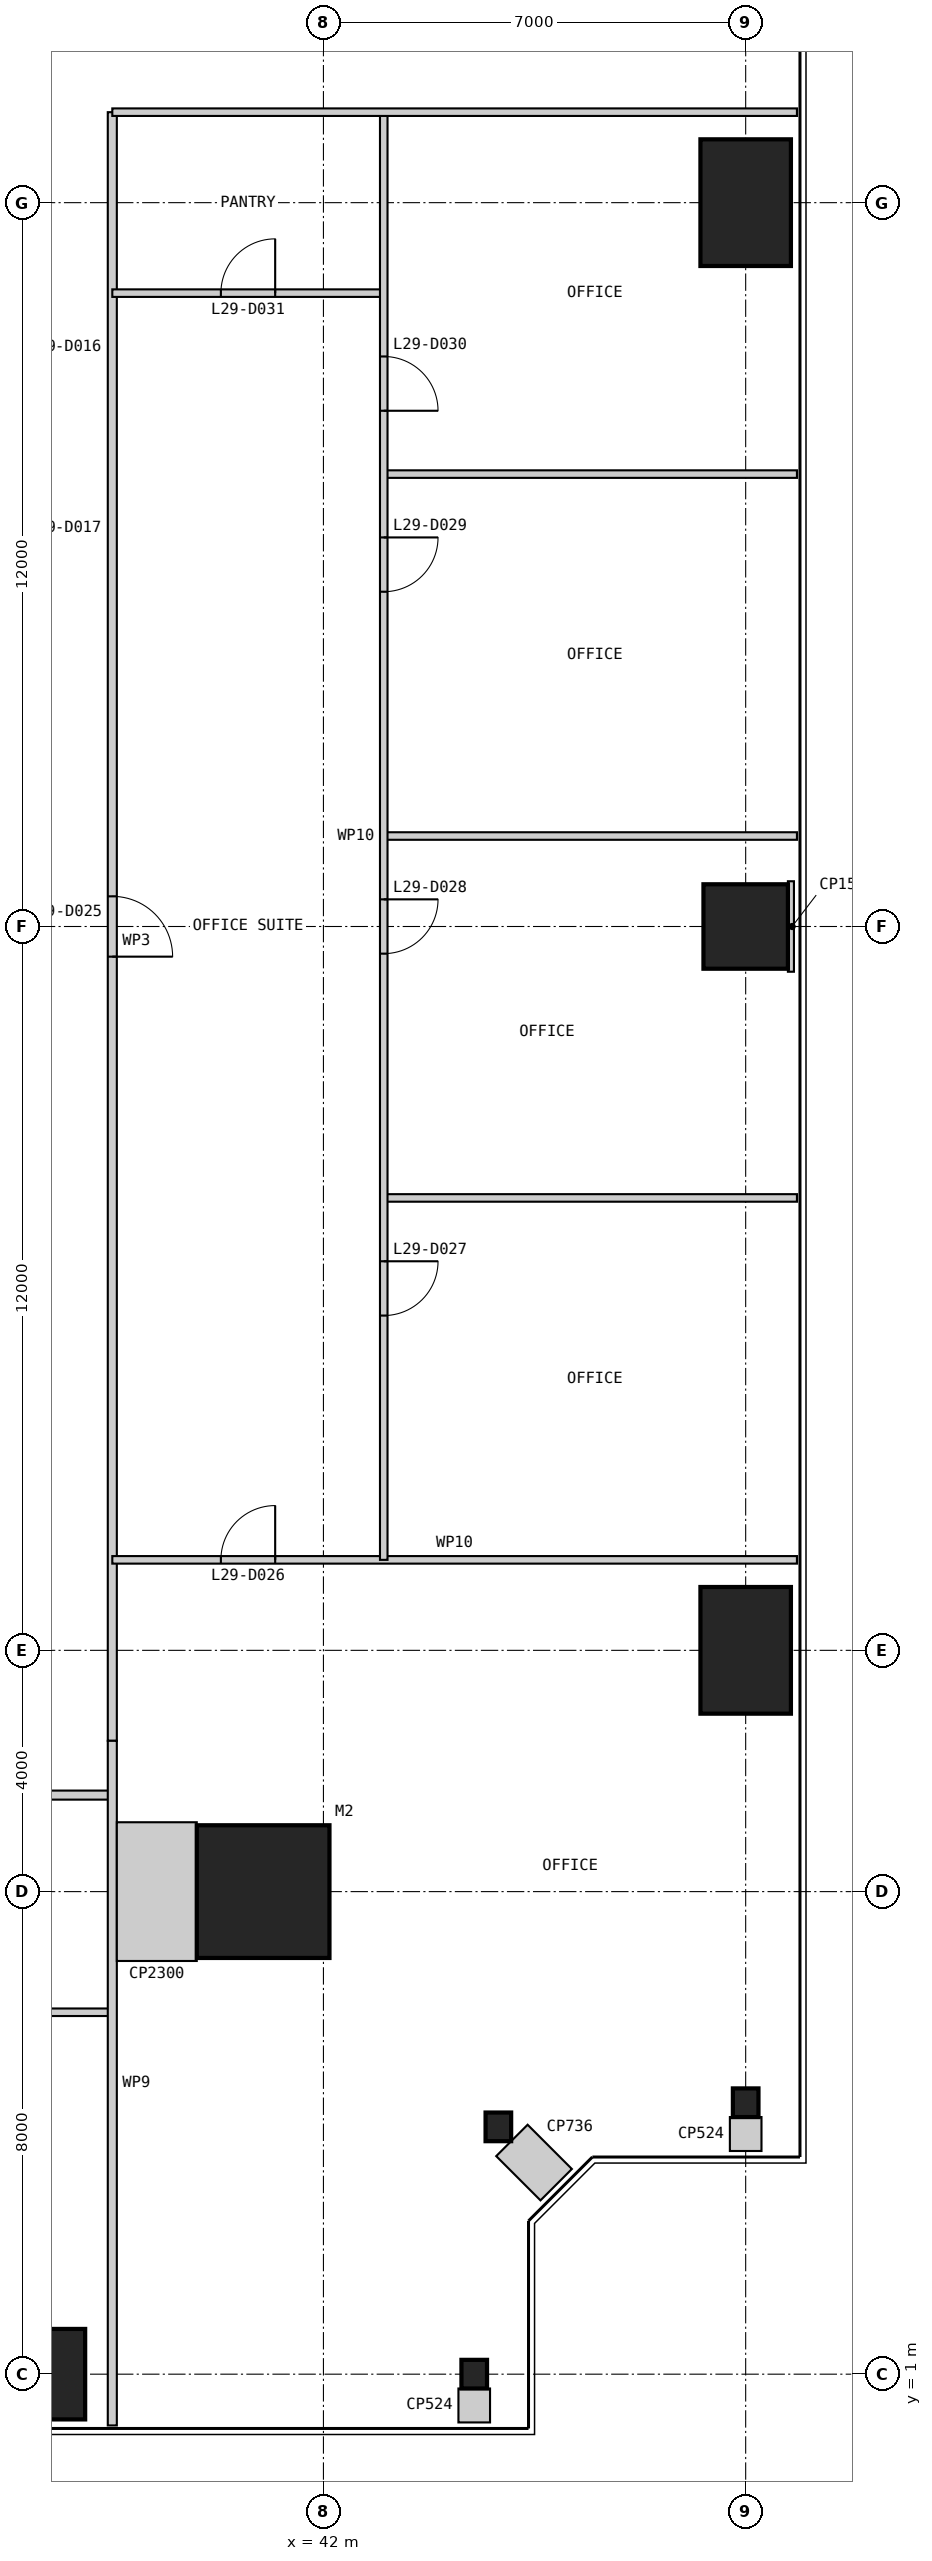
"""IFC4 building model, lengths in metres.
Left out: names, types, materials, properties, quantities, classifications, styles, units other than length and angle.
Written with IfcOpenShell. Run it as: python <this file> out.ifc"""

import sys

from ifc_helpers import new_model, si_unit, direction, frame, frame_2d, origin, origin_2d, place, context, subcontext, project, spatial, rectangle, i_section, extrude, element, fill, save


model = new_model("IFC4")
c1 = context("Model", 3, precision=1e-05, world=origin(), true_north=direction((0.0, 1.0)))
c2 = subcontext(c1, "Body", "Model", "MODEL_VIEW")
j1 = project(units=[si_unit("LENGTHUNIT", "METRE"), si_unit("PLANEANGLEUNIT", "RADIAN")], contexts=[c1])
p1 = place(None, origin())
s1 = spatial("IfcSite", under=j1, at=p1, CompositionType="ELEMENT")
p2 = place(p1, origin())
s2 = spatial("IfcBuilding", under=s1, at=p2, CompositionType="ELEMENT")
p3 = place(p2, frame((0.0, 0.0, 126.4)))
s3 = spatial("IfcBuildingStorey", under=s2, at=p3, CompositionType="ELEMENT", Elevation=126.4)
p4 = place(p3, frame((41.0, 9.0, 0.0), z_axis=(0.0, 0.0, 1.0), x_axis=(1.0, 0.0, 0.0)))
e1 = element("IfcColumn", 1, at=p4, inside=s3, PredefinedType="COLUMN", context=c2, shape_type="SweptSolid", body=[
    extrude(rectangle(XDim=2.2, YDim=2.2, at=origin_2d()), origin(), (0.0, 0.0, 1.0), 4.0),
])
p5 = place(p3, frame((37.0, 1.0, 0.0), z_axis=(0.0, 0.0, 1.0), x_axis=(1.0, 0.0, 0.0)))
e2 = element("IfcColumn", 2, at=p5, inside=s3, PredefinedType="COLUMN", context=c2, shape_type="SweptSolid", body=[
    extrude(rectangle(XDim=2.1, YDim=1.5, at=origin_2d()), origin(), (0.0, 0.0, 1.0), 4.0),
])
for number, where, z_axis, x_axis in (
    (3, (44.5, 1.0, 0.0), (0.0, 0.0, 1.0), (1.0, 0.0, 0.0)),
    (4, (44.9, 5.1, 0.0), (0.0, 0.0, 1.0), (1.0, 0.0, 0.0)),
    (5, (49.0, 5.5, 0.0), (0.0, 0.0, 1.0), (1.0, 0.0, 0.0)),
):
    element("IfcColumn", number, at=place(p3, frame(where, z_axis=z_axis, x_axis=x_axis)), inside=s3, PredefinedType="COLUMN", context=c2, shape_type="SweptSolid", body=[
        extrude(i_section(OverallWidth=0.424, OverallDepth=0.475, WebThickness=0.048, FlangeThickness=0.077, at=origin_2d()), origin(), (0.0, 0.0, 1.0), 4.0),
    ])
p6 = place(p3, frame((49.0, 13.0, 0.0), z_axis=(0.0, 0.0, 1.0), x_axis=(1.0, 0.0, 0.0)))
e6 = element("IfcColumn", 6, at=p6, inside=s3, PredefinedType="COLUMN", context=c2, shape_type="SweptSolid", body=[
    extrude(rectangle(XDim=1.5, YDim=2.1, at=origin_2d()), origin(), (0.0, 0.0, 1.0), 4.0),
])
p7 = place(p3, frame((49.0, 25.0, 0.0), z_axis=(0.0, 0.0, 1.0), x_axis=(1.0, 0.0, 0.0)))
e7 = element("IfcColumn", 7, at=p7, inside=s3, PredefinedType="COLUMN", context=c2, shape_type="SweptSolid", body=[
    extrude(rectangle(XDim=1.4, YDim=1.4, at=origin_2d()), origin(), (0.0, 0.0, 1.0), 4.0),
])
p8 = place(p3, frame((49.0, 37.0, 0.0), z_axis=(0.0, 0.0, 1.0), x_axis=(1.0, 0.0, 0.0)))
e8 = element("IfcColumn", 8, at=p8, inside=s3, PredefinedType="COLUMN", context=c2, shape_type="SweptSolid", body=[
    extrude(rectangle(XDim=1.5, YDim=2.1, at=origin_2d()), origin(), (0.0, 0.0, 1.0), 4.0),
])
p9 = place(p3, frame((10.6, 10.6, 0.0), z_axis=(0.0, 0.0, 1.0), x_axis=(1.0, 0.0, 0.0)))
e9 = element("IfcWall", 9, at=p9, inside=s3, PredefinedType="PARTITIONING", context=c2, shape_type="SweptSolid", body=[
    extrude(rectangle(XDim=27.9, YDim=0.15, at=frame_2d((13.95, 0.0))), origin(), (0.0, 0.0, 1.0), 3.85),
])
p10 = place(p9, frame((1.15, 0.0, 0.0)))
e10 = element("IfcOpeningElement", 10, at=p10, cuts=e9, PredefinedType="OPENING", context=c2, shape_type="SweptSolid", body=[
    extrude(rectangle(XDim=1.0, YDim=2.2, at=frame_2d((0.5, 1.1))), frame((0.0, 0.085, 0.0), z_axis=(0.0, -1.0, 0.0), x_axis=(1.0, 0.0, 0.0)), (0.0, 0.0, 1.0), 0.17),
])
p11 = place(p9, frame((23.65, 0.0, 0.0)))
e11 = element("IfcOpeningElement", 11, at=p11, cuts=e9, PredefinedType="OPENING", context=c2, shape_type="SweptSolid", body=[
    extrude(rectangle(XDim=1.0, YDim=2.2, at=frame_2d((0.5, 1.1))), frame((0.0, 0.085, 0.0), z_axis=(0.0, -1.0, 0.0), x_axis=(1.0, 0.0, 0.0)), (0.0, 0.0, 1.0), 0.17),
])
p12 = place(p3, frame((14.5, 7.0, 0.0), z_axis=(0.0, 0.0, 1.0), x_axis=(1.0, 0.0, 0.0)))
e12 = element("IfcWall", 12, at=p12, inside=s3, PredefinedType="PARTITIONING", context=c2, shape_type="SweptSolid", body=[
    extrude(rectangle(XDim=24.0, YDim=0.125, at=frame_2d((12.0, 0.0))), origin(), (0.0, 0.0, 1.0), 3.85),
])
p13 = place(p12, frame((10.05, 0.0, 0.0)))
e13 = element("IfcOpeningElement", 13, at=p13, cuts=e12, PredefinedType="OPENING", context=c2, shape_type="SweptSolid", body=[
    extrude(rectangle(XDim=0.9, YDim=2.2, at=frame_2d((0.45, 1.1))), frame((0.0, 0.073, 0.0), z_axis=(0.0, -1.0, 0.0), x_axis=(1.0, 0.0, 0.0)), (0.0, 0.0, 1.0), 0.145),
])
p14 = place(p12, frame((16.05, 0.0, 0.0)))
e14 = element("IfcOpeningElement", 14, at=p14, cuts=e12, PredefinedType="OPENING", context=c2, shape_type="SweptSolid", body=[
    extrude(rectangle(XDim=0.9, YDim=2.2, at=frame_2d((0.45, 1.1))), frame((0.0, 0.073, 0.0), z_axis=(0.0, -1.0, 0.0), x_axis=(1.0, 0.0, 0.0)), (0.0, 0.0, 1.0), 0.145),
])
p15 = place(p12, frame((19.0, 0.0, 0.0)))
e15 = element("IfcOpeningElement", 15, at=p15, cuts=e12, PredefinedType="OPENING", context=c2, shape_type="SweptSolid", body=[
    extrude(rectangle(XDim=1.0, YDim=2.2, at=frame_2d((0.5, 1.1))), frame((0.0, 0.073, 0.0), z_axis=(0.0, -1.0, 0.0), x_axis=(1.0, 0.0, 0.0)), (0.0, 0.0, 1.0), 0.145),
])
p16 = place(p3, frame((38.5, 11.5, 0.0), z_axis=(0.0, 0.0, 1.0), x_axis=(0.0, 1.0, 0.0)))
e16 = element("IfcWall", 16, at=p16, inside=s3, PredefinedType="PARTITIONING", context=c2, shape_type="SweptSolid", body=[
    extrude(rectangle(XDim=27.0, YDim=0.15, at=frame_2d((13.5, 0.0))), origin(), (0.0, 0.0, 1.0), 3.85),
])
p17 = place(p16, frame((13.0, 0.0, 0.0)))
e17 = element("IfcOpeningElement", 17, at=p17, cuts=e16, PredefinedType="OPENING", context=c2, shape_type="SweptSolid", body=[
    extrude(rectangle(XDim=1.0, YDim=2.2, at=frame_2d((0.5, 1.1))), frame((0.0, 0.085, 0.0), z_axis=(0.0, -1.0, 0.0), x_axis=(1.0, 0.0, 0.0)), (0.0, 0.0, 1.0), 0.17),
])
p18 = place(p3, frame((38.5, 0.15, 0.0), z_axis=(0.0, 0.0, 1.0), x_axis=(0.0, 1.0, 0.0)))
e18 = element("IfcWall", 18, at=p18, inside=s3, PredefinedType="PARTITIONING", context=c2, shape_type="SweptSolid", body=[
    extrude(rectangle(XDim=11.35, YDim=0.15, at=frame_2d((5.675, 0.0))), origin(), (0.0, 0.0, 1.0), 3.85),
])
p19 = place(p3, frame((49.85, 14.5, 0.0), z_axis=(0.0, 0.0, 1.0), x_axis=(-1.0, 0.0, 0.0)))
e19 = element("IfcWall", 19, at=p19, inside=s3, PredefinedType="PARTITIONING", context=c2, shape_type="SweptSolid", body=[
    extrude(rectangle(XDim=11.35, YDim=0.125, at=frame_2d((5.675, 0.0))), origin(), (0.0, 0.0, 1.0), 3.85),
])
p20 = place(p19, frame((8.65, 0.0, 0.0)))
e20 = element("IfcOpeningElement", 20, at=p20, cuts=e19, PredefinedType="OPENING", context=c2, shape_type="SweptSolid", body=[
    extrude(rectangle(XDim=0.9, YDim=2.2, at=frame_2d((0.45, 1.1))), frame((0.0, 0.073, 0.0), z_axis=(0.0, -1.0, 0.0), x_axis=(1.0, 0.0, 0.0)), (0.0, 0.0, 1.0), 0.145),
])
for number, where, z_axis, x_axis in (
    (21, (49.85, 20.5, 0.0), (0.0, 0.0, 1.0), (-1.0, 0.0, 0.0)),
    (22, (49.85, 26.5, 0.0), (0.0, 0.0, 1.0), (-1.0, 0.0, 0.0)),
    (23, (49.85, 32.5, 0.0), (0.0, 0.0, 1.0), (-1.0, 0.0, 0.0)),
):
    element("IfcWall", number, at=place(p3, frame(where, z_axis=z_axis, x_axis=x_axis)), inside=s3, PredefinedType="PARTITIONING", context=c2, shape_type="SweptSolid", body=[
        extrude(rectangle(XDim=6.85, YDim=0.125, at=frame_2d((3.425, 0.0))), origin(), (0.0, 0.0, 1.0), 3.85),
    ])
p21 = place(p3, frame((43.0, 35.5, 0.0), z_axis=(0.0, 0.0, 1.0), x_axis=(-1.0, 0.0, 0.0)))
e24 = element("IfcWall", 24, at=p21, inside=s3, PredefinedType="PARTITIONING", context=c2, shape_type="SweptSolid", body=[
    extrude(rectangle(XDim=4.5, YDim=0.125, at=frame_2d((2.25, 0.0))), origin(), (0.0, 0.0, 1.0), 3.85),
])
p22 = place(p21, frame((1.8, 0.0, 0.0)))
e25 = element("IfcOpeningElement", 25, at=p22, cuts=e24, PredefinedType="OPENING", context=c2, shape_type="SweptSolid", body=[
    extrude(rectangle(XDim=0.9, YDim=2.2, at=frame_2d((0.45, 1.1))), frame((0.0, 0.073, 0.0), z_axis=(0.0, -1.0, 0.0), x_axis=(1.0, 0.0, 0.0)), (0.0, 0.0, 1.0), 0.145),
])
p23 = place(p3, frame((43.0, 14.5, 0.0), z_axis=(0.0, 0.0, 1.0), x_axis=(0.0, 1.0, 0.0)))
e26 = element("IfcWall", 26, at=p23, inside=s3, PredefinedType="PARTITIONING", context=c2, shape_type="SweptSolid", body=[
    extrude(rectangle(XDim=24.0, YDim=0.125, at=frame_2d((12.0, 0.0))), origin(), (0.0, 0.0, 1.0), 3.238),
])
p24 = place(p23, frame((4.05, 0.0, 0.0)))
e27 = element("IfcOpeningElement", 27, at=p24, cuts=e26, PredefinedType="OPENING", context=c2, shape_type="SweptSolid", body=[
    extrude(rectangle(XDim=0.9, YDim=2.2, at=frame_2d((0.45, 1.1))), frame((0.0, 0.073, 0.0), z_axis=(0.0, -1.0, 0.0), x_axis=(1.0, 0.0, 0.0)), (0.0, 0.0, 1.0), 0.145),
])
p25 = place(p23, frame((10.05, 0.0, 0.0)))
e28 = element("IfcOpeningElement", 28, at=p25, cuts=e26, PredefinedType="OPENING", context=c2, shape_type="SweptSolid", body=[
    extrude(rectangle(XDim=0.9, YDim=2.2, at=frame_2d((0.45, 1.1))), frame((0.0, 0.073, 0.0), z_axis=(0.0, -1.0, 0.0), x_axis=(1.0, 0.0, 0.0)), (0.0, 0.0, 1.0), 0.145),
])
p26 = place(p23, frame((16.05, 0.0, 0.0)))
e29 = element("IfcOpeningElement", 29, at=p26, cuts=e26, PredefinedType="OPENING", context=c2, shape_type="SweptSolid", body=[
    extrude(rectangle(XDim=0.9, YDim=2.2, at=frame_2d((0.45, 1.1))), frame((0.0, 0.073, 0.0), z_axis=(0.0, -1.0, 0.0), x_axis=(1.0, 0.0, 0.0)), (0.0, 0.0, 1.0), 0.145),
])
p27 = place(p23, frame((19.05, 0.0, 0.0)))
e30 = element("IfcOpeningElement", 30, at=p27, cuts=e26, PredefinedType="OPENING", context=c2, shape_type="SweptSolid", body=[
    extrude(rectangle(XDim=0.9, YDim=2.2, at=frame_2d((0.45, 1.1))), frame((0.0, 0.073, 0.0), z_axis=(0.0, -1.0, 0.0), x_axis=(1.0, 0.0, 0.0)), (0.0, 0.0, 1.0), 0.145),
])
p28 = place(p3, frame((49.85, 38.5, 0.0), z_axis=(0.0, 0.0, 1.0), x_axis=(-1.0, 0.0, 0.0)))
e31 = element("IfcWall", 31, at=p28, inside=s3, PredefinedType="PARTITIONING", context=c2, shape_type="SweptSolid", body=[
    extrude(rectangle(XDim=11.35, YDim=0.125, at=frame_2d((5.675, 0.0))), origin(), (0.0, 0.0, 1.0), 3.85),
])
p29 = place(p3, frame((38.575, 9.0, 0.0), z_axis=(0.0, 0.0, 1.0), x_axis=(1.0, 0.0, 0.0)))
e32 = element("IfcWall", 32, at=p29, inside=s3, PredefinedType="PARTITIONING", context=c2, shape_type="SweptSolid", body=[
    extrude(rectangle(XDim=1.325, YDim=2.3, at=frame_2d((0.663, 0.0))), origin(), (0.0, 0.0, 1.0), 3.85),
])
p30 = place(p3, frame((44.5, 0.2, 0.0), z_axis=(0.0, 0.0, 1.0), x_axis=(0.0, 1.0, 0.0)))
e33 = element("IfcWall", 33, at=p30, inside=s3, PredefinedType="PARTITIONING", context=c2, shape_type="SweptSolid", body=[
    extrude(rectangle(XDim=0.562, YDim=0.524, at=frame_2d((0.281, 0.0))), origin(), (0.0, 0.0, 1.0), 3.85),
])
p31 = place(p3, frame((45.859, 4.141, 0.0), z_axis=(0.0, 0.0, 1.0), x_axis=(-0.707106781187, 0.707106781187, 0.0)))
e34 = element("IfcWall", 34, at=p31, inside=s3, PredefinedType="PARTITIONING", context=c2, shape_type="SweptSolid", body=[
    extrude(rectangle(XDim=1.038, YDim=0.736, at=frame_2d((0.519, 0.0))), origin(), (0.0, 0.0, 1.0), 3.85),
])
p32 = place(p3, frame((49.0, 4.7, 0.0), z_axis=(0.0, 0.0, 1.0), x_axis=(0.0, 1.0, 0.0)))
e35 = element("IfcWall", 35, at=p32, inside=s3, PredefinedType="PARTITIONING", context=c2, shape_type="SweptSolid", body=[
    extrude(rectangle(XDim=0.562, YDim=0.524, at=frame_2d((0.281, 0.0))), origin(), (0.0, 0.0, 1.0), 3.85),
])
p33 = place(p3, frame((49.8, 25.0, 0.0), z_axis=(0.0, 0.0, 1.0), x_axis=(-1.0, 0.0, 0.0)))
e36 = element("IfcWall", 36, at=p33, inside=s3, PredefinedType="PARTITIONING", context=c2, shape_type="SweptSolid", body=[
    extrude(rectangle(XDim=0.1, YDim=1.5, at=frame_2d((0.05, 0.0))), origin(), (0.0, 0.0, 1.0), 3.85),
])
p34 = place(p17, frame((1.0, 0.0, 0.0), z_axis=(0.0, 0.0, 1.0), x_axis=(-1.0, 0.0, 0.0)))
e37 = element("IfcDoor", 37, at=p34, inside=s3, OperationType="SINGLE_SWING_RIGHT", PredefinedType="DOOR", context=c2, shape_type="SweptSolid", body=[
    extrude(rectangle(XDim=1.0, YDim=2.2, at=frame_2d((0.5, 1.1))), frame((0.0, 0.025, 0.0), z_axis=(0.0, -1.0, 0.0), x_axis=(1.0, 0.0, 0.0)), (0.0, 0.0, 1.0), 0.05),
])
fill(e17, e37)
p35 = place(p20, frame((0.9, 0.0, 0.0), z_axis=(0.0, 0.0, 1.0), x_axis=(-1.0, 0.0, 0.0)))
e38 = element("IfcDoor", 38, at=p35, inside=s3, OperationType="SINGLE_SWING_RIGHT", PredefinedType="DOOR", context=c2, shape_type="SweptSolid", body=[
    extrude(rectangle(XDim=0.9, YDim=2.2, at=frame_2d((0.45, 1.1))), frame((0.0, 0.025, 0.0), z_axis=(0.0, -1.0, 0.0), x_axis=(1.0, 0.0, 0.0)), (0.0, 0.0, 1.0), 0.05),
])
fill(e20, e38)
p36 = place(p24, frame((0.9, 0.0, 0.0), z_axis=(0.0, 0.0, 1.0), x_axis=(-1.0, 0.0, 0.0)))
e39 = element("IfcDoor", 39, at=p36, inside=s3, OperationType="SINGLE_SWING_LEFT", PredefinedType="DOOR", context=c2, shape_type="SweptSolid", body=[
    extrude(rectangle(XDim=0.9, YDim=2.2, at=frame_2d((0.45, 1.1))), frame((0.0, 0.025, 0.0), z_axis=(0.0, -1.0, 0.0), x_axis=(1.0, 0.0, 0.0)), (0.0, 0.0, 1.0), 0.05),
])
fill(e27, e39)
p37 = place(p25, frame((0.9, 0.0, 0.0), z_axis=(0.0, 0.0, 1.0), x_axis=(-1.0, 0.0, 0.0)))
e40 = element("IfcDoor", 40, at=p37, inside=s3, OperationType="SINGLE_SWING_LEFT", PredefinedType="DOOR", context=c2, shape_type="SweptSolid", body=[
    extrude(rectangle(XDim=0.9, YDim=2.2, at=frame_2d((0.45, 1.1))), frame((0.0, 0.025, 0.0), z_axis=(0.0, -1.0, 0.0), x_axis=(1.0, 0.0, 0.0)), (0.0, 0.0, 1.0), 0.05),
])
fill(e28, e40)
p38 = place(p26, frame((0.9, 0.0, 0.0), z_axis=(0.0, 0.0, 1.0), x_axis=(-1.0, 0.0, 0.0)))
e41 = element("IfcDoor", 41, at=p38, inside=s3, OperationType="SINGLE_SWING_LEFT", PredefinedType="DOOR", context=c2, shape_type="SweptSolid", body=[
    extrude(rectangle(XDim=0.9, YDim=2.2, at=frame_2d((0.45, 1.1))), frame((0.0, 0.025, 0.0), z_axis=(0.0, -1.0, 0.0), x_axis=(1.0, 0.0, 0.0)), (0.0, 0.0, 1.0), 0.05),
])
fill(e29, e41)
p39 = place(p27, frame((0.9, 0.0, 0.0), z_axis=(0.0, 0.0, 1.0), x_axis=(-1.0, 0.0, 0.0)))
e42 = element("IfcDoor", 42, at=p39, inside=s3, OperationType="SINGLE_SWING_RIGHT", PredefinedType="DOOR", context=c2, shape_type="SweptSolid", body=[
    extrude(rectangle(XDim=0.9, YDim=2.2, at=frame_2d((0.45, 1.1))), frame((0.0, 0.025, 0.0), z_axis=(0.0, -1.0, 0.0), x_axis=(1.0, 0.0, 0.0)), (0.0, 0.0, 1.0), 0.05),
])
fill(e30, e42)
p40 = place(p22, frame((0.9, 0.0, 0.0), z_axis=(0.0, 0.0, 1.0), x_axis=(-1.0, 0.0, 0.0)))
e43 = element("IfcDoor", 43, at=p40, inside=s3, OperationType="SINGLE_SWING_RIGHT", PredefinedType="DOOR", context=c2, shape_type="SweptSolid", body=[
    extrude(rectangle(XDim=0.9, YDim=2.2, at=frame_2d((0.45, 1.1))), frame((0.0, 0.025, 0.0), z_axis=(0.0, -1.0, 0.0), x_axis=(1.0, 0.0, 0.0)), (0.0, 0.0, 1.0), 0.05),
])
fill(e25, e43)
save(model, sys.argv[1])
